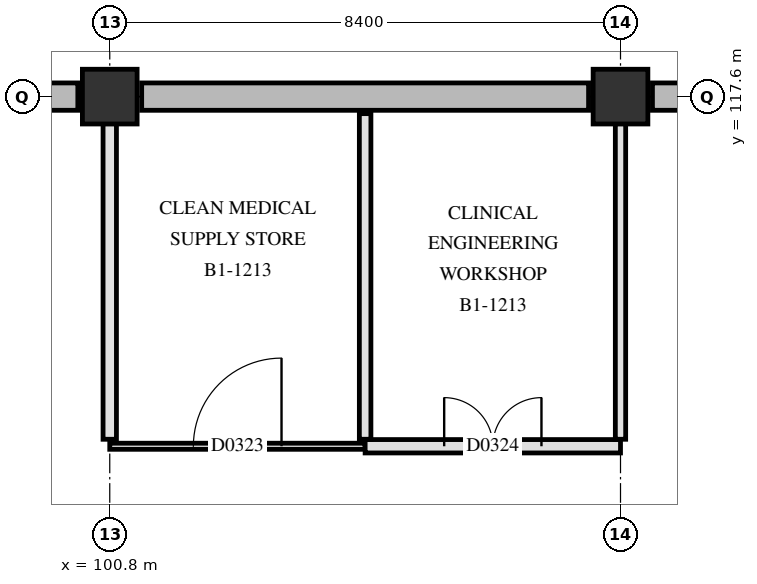
"""IFC4 building model, lengths in metres.
Left out: names, types, materials, properties, quantities, classifications, styles, units other than length and angle.
Written with IfcOpenShell. Run it as: python <this file> out.ifc"""

import sys

from ifc_helpers import new_model, si_unit, direction, frame, frame_2d, origin, origin_2d, place, context, subcontext, project, spatial, rectangle, extrude, element, fill, save


model = new_model("IFC4")
c1 = context("Model", 3, precision=1e-05, world=origin(), true_north=direction((0.0, 1.0)))
c2 = subcontext(c1, "Body", "Model", "MODEL_VIEW")
j1 = project(units=[si_unit("LENGTHUNIT", "METRE"), si_unit("PLANEANGLEUNIT", "RADIAN")], contexts=[c1])
p1 = place(None, origin())
s1 = spatial("IfcSite", under=j1, at=p1, CompositionType="ELEMENT")
p2 = place(p1, origin())
s2 = spatial("IfcBuilding", under=s1, at=p2, CompositionType="ELEMENT")
p3 = place(p2, frame((0.0, 0.0, -5.4)))
s3 = spatial("IfcBuildingStorey", under=s2, at=p3, CompositionType="ELEMENT", Elevation=-5.4)
for number, where, z_axis, x_axis in (
    (1, (100.8, 117.6, 0.0), (0.0, 0.0, 1.0), (1.0, 0.0, 0.0)),
    (2, (109.2, 117.6, 0.0), (0.0, 0.0, 1.0), (1.0, 0.0, 0.0)),
):
    element("IfcColumn", number, at=place(p3, frame(where, z_axis=z_axis, x_axis=x_axis)), inside=s3, PredefinedType="COLUMN", context=c2, shape_type="SweptSolid", body=[
        extrude(rectangle(XDim=0.9, YDim=0.9, at=origin_2d()), origin(), (0.0, 0.0, 1.0), 5.4),
    ])
p4 = place(p3, frame((92.925, 117.6, 0.0), z_axis=(0.0, 0.0, 1.0), x_axis=(1.0, 0.0, 0.0)))
e3 = element("IfcWall", 3, at=p4, inside=s3, PredefinedType="SOLIDWALL", context=c2, shape_type="SweptSolid", body=[
    extrude(rectangle(XDim=7.35, YDim=0.45, at=frame_2d((3.675, 0.0))), origin(), (0.0, 0.0, 1.0), 5.08),
])
p5 = place(p3, frame((101.325, 117.6, 0.0), z_axis=(0.0, 0.0, 1.0), x_axis=(1.0, 0.0, 0.0)))
e4 = element("IfcWall", 4, at=p5, inside=s3, PredefinedType="SOLIDWALL", context=c2, shape_type="SweptSolid", body=[
    extrude(rectangle(XDim=7.35, YDim=0.45, at=frame_2d((3.675, 0.0))), origin(), (0.0, 0.0, 1.0), 5.08),
])
p6 = place(p3, frame((109.725, 117.6, 0.0), z_axis=(0.0, 0.0, 1.0), x_axis=(1.0, 0.0, 0.0)))
e5 = element("IfcWall", 5, at=p6, inside=s3, PredefinedType="SOLIDWALL", context=c2, shape_type="SweptSolid", body=[
    extrude(rectangle(XDim=7.35, YDim=0.45, at=frame_2d((3.675, 0.0))), origin(), (0.0, 0.0, 1.0), 5.08),
])
p7 = place(p3, frame((100.8, 111.85, 0.0), z_axis=(0.0, 0.0, 1.0), x_axis=(1.0, 0.0, 0.0)))
e6 = element("IfcWall", 6, at=p7, inside=s3, PredefinedType="PARTITIONING", context=c2, shape_type="SweptSolid", body=[
    extrude(rectangle(XDim=4.2, YDim=0.1, at=frame_2d((2.1, 0.0))), origin(), (0.0, 0.0, 1.0), 4.47),
])
p8 = place(p7, frame((1.375, 0.0, 0.0)))
e7 = element("IfcOpeningElement", 7, at=p8, cuts=e6, PredefinedType="OPENING", context=c2, shape_type="SweptSolid", body=[
    extrude(rectangle(XDim=1.45, YDim=2.2, at=frame_2d((0.725, 1.1))), frame((0.0, 0.06, 0.0), z_axis=(0.0, -1.0, 0.0), x_axis=(1.0, 0.0, 0.0)), (0.0, 0.0, 1.0), 0.12),
])
p9 = place(p3, frame((105.0, 111.85, 0.0), z_axis=(0.0, 0.0, 1.0), x_axis=(1.0, 0.0, 0.0)))
e8 = element("IfcWall", 8, at=p9, inside=s3, PredefinedType="PARTITIONING", context=c2, shape_type="SweptSolid", body=[
    extrude(rectangle(XDim=4.2, YDim=0.22, at=frame_2d((2.1, 0.0))), origin(), (0.0, 0.0, 1.0), 4.47),
])
p10 = place(p9, frame((1.3, 0.0, 0.0)))
e9 = element("IfcOpeningElement", 9, at=p10, cuts=e8, PredefinedType="OPENING", context=c2, shape_type="SweptSolid", body=[
    extrude(rectangle(XDim=1.6, YDim=2.25, at=frame_2d((0.8, 1.125))), frame((0.0, 0.12, 0.0), z_axis=(0.0, -1.0, 0.0), x_axis=(1.0, 0.0, 0.0)), (0.0, 0.0, 1.0), 0.24),
])
p11 = place(p3, frame((100.8, 111.965, 0.0), z_axis=(0.0, 0.0, 1.0), x_axis=(0.0, 1.0, 0.0)))
e10 = element("IfcWall", 10, at=p11, inside=s3, PredefinedType="PARTITIONING", context=c2, shape_type="SweptSolid", body=[
    extrude(rectangle(XDim=5.19, YDim=0.22, at=frame_2d((2.595, 0.0))), origin(), (0.0, 0.0, 1.0), 4.47),
])
p12 = place(p3, frame((105.0, 111.965, 0.0), z_axis=(0.0, 0.0, 1.0), x_axis=(0.0, 1.0, 0.0)))
e11 = element("IfcWall", 11, at=p12, inside=s3, PredefinedType="PARTITIONING", context=c2, shape_type="SweptSolid", body=[
    extrude(rectangle(XDim=5.355, YDim=0.19, at=frame_2d((2.677, 0.0))), origin(), (0.0, 0.0, 1.0), 5.07),
])
p13 = place(p3, frame((109.2, 111.965, 0.0), z_axis=(0.0, 0.0, 1.0), x_axis=(0.0, 1.0, 0.0)))
e12 = element("IfcWall", 12, at=p13, inside=s3, PredefinedType="PARTITIONING", context=c2, shape_type="SweptSolid", body=[
    extrude(rectangle(XDim=5.19, YDim=0.17, at=frame_2d((2.595, 0.0))), origin(), (0.0, 0.0, 1.0), 4.47),
])
p14 = place(p8, origin())
e13 = element("IfcDoor", 13, at=p14, inside=s3, OperationType="SINGLE_SWING_RIGHT", PredefinedType="DOOR", context=c2, shape_type="SweptSolid", body=[
    extrude(rectangle(XDim=1.45, YDim=2.2, at=frame_2d((0.725, 1.1))), frame((0.0, 0.025, 0.0), z_axis=(0.0, -1.0, 0.0), x_axis=(1.0, 0.0, 0.0)), (0.0, 0.0, 1.0), 0.05),
])
fill(e7, e13)
p15 = place(p10, origin())
e14 = element("IfcDoor", 14, at=p15, inside=s3, OperationType="DOUBLE_SWING_LEFT", PredefinedType="DOOR", context=c2, shape_type="SweptSolid", body=[
    extrude(rectangle(XDim=1.6, YDim=2.25, at=frame_2d((0.8, 1.125))), frame((0.0, 0.025, 0.0), z_axis=(0.0, -1.0, 0.0), x_axis=(1.0, 0.0, 0.0)), (0.0, 0.0, 1.0), 0.05),
])
fill(e9, e14)
save(model, sys.argv[1])
